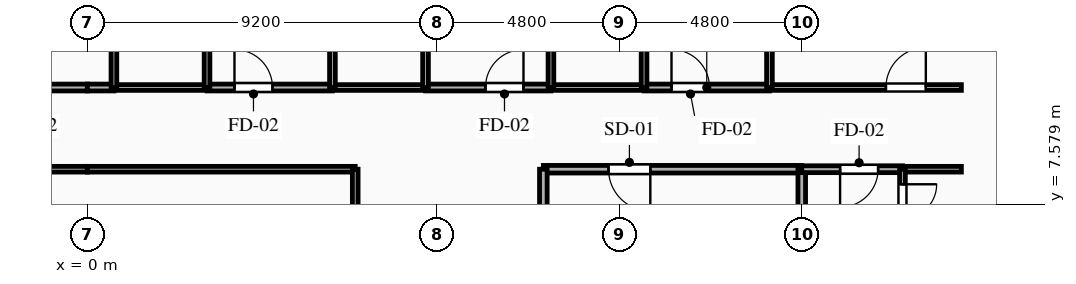
"""IFC4 building model, lengths in metres.
Left out: names, types, materials, properties, quantities, classifications, styles, units other than length and angle.
Written with IfcOpenShell. Run it as: python <this file> out.ifc"""

import sys

from ifc_helpers import new_model, si_unit, direction, frame, frame_2d, origin, place, context, subcontext, project, spatial, rectangle, extrude, element, fill, save


model = new_model("IFC4")
c1 = context("Model", 3, precision=1e-05, world=origin(), true_north=direction((0.0, 1.0)))
c2 = subcontext(c1, "Body", "Model", "MODEL_VIEW")
j1 = project(units=[si_unit("LENGTHUNIT", "METRE"), si_unit("PLANEANGLEUNIT", "RADIAN")], contexts=[c1])
p1 = place(None, origin())
s1 = spatial("IfcSite", under=j1, at=p1, CompositionType="ELEMENT")
p2 = place(p1, origin())
s2 = spatial("IfcBuilding", under=s1, at=p2, CompositionType="ELEMENT")
p3 = place(p2, frame((0.0, 0.0, 53.8)))
s3 = spatial("IfcBuildingStorey", under=s2, at=p3, CompositionType="ELEMENT", Elevation=53.8)
p4 = place(p3, frame((18.8, 8.5, 0.0), z_axis=(0.0, 0.0, 1.0), x_axis=(-1.0, 0.0, 0.0)))
e1 = element("IfcWall", 1, at=p4, inside=s3, PredefinedType="PARTITIONING", context=c2, shape_type="SweptSolid", body=[
    extrude(rectangle(XDim=6.8, YDim=0.2, at=frame_2d((3.4, 0.0))), origin(), (0.0, 0.0, 1.0), 3.035),
])
p5 = place(p4, frame((3.985, 0.0, 0.0)))
e2 = element("IfcOpeningElement", 2, at=p5, cuts=e1, PredefinedType="OPENING", context=c2, shape_type="SweptSolid", body=[
    extrude(rectangle(XDim=1.1, YDim=2.15, at=frame_2d((0.55, 1.075))), frame((0.0, 0.11, 0.0), z_axis=(0.0, -1.0, 0.0), x_axis=(1.0, 0.0, 0.0)), (0.0, 0.0, 1.0), 0.22),
])
p6 = place(p3, frame((12.0, 8.5, 0.0), z_axis=(0.0, 0.0, 1.0), x_axis=(0.0, -1.0, 0.0)))
e3 = element("IfcWall", 3, at=p6, inside=s3, PredefinedType="PARTITIONING", context=c2, shape_type="SweptSolid", body=[
    extrude(rectangle(XDim=2.9, YDim=0.2, at=frame_2d((1.45, 0.0))), origin(), (0.0, 0.0, 1.0), 3.035),
])
p7 = place(p3, frame((18.8, 5.6, 0.0), z_axis=(0.0, 0.0, 1.0), x_axis=(0.0, 1.0, 0.0)))
e4 = element("IfcWall", 4, at=p7, inside=s3, PredefinedType="PARTITIONING", context=c2, shape_type="SweptSolid", body=[
    extrude(rectangle(XDim=2.9, YDim=0.2, at=frame_2d((1.45, 0.0))), origin(), (0.0, 0.0, 1.0), 2.52),
])
p8 = place(p3, frame((-2.6, 10.65, 0.0), z_axis=(0.0, 0.0, 1.0), x_axis=(1.0, 0.0, 0.0)))
e5 = element("IfcWall", 5, at=p8, inside=s3, PredefinedType="PARTITIONING", context=c2, shape_type="SweptSolid", body=[
    extrude(rectangle(XDim=2.6, YDim=0.18, at=frame_2d((1.3, 0.0))), origin(), (0.0, 0.0, 1.0), 3.035),
])
p9 = place(p8, frame((0.635, 0.0, 0.0)))
e6 = element("IfcOpeningElement", 6, at=p9, cuts=e5, PredefinedType="OPENING", context=c2, shape_type="SweptSolid", body=[
    extrude(rectangle(XDim=1.0, YDim=2.15, at=frame_2d((0.5, 1.075))), frame((0.0, 0.1, 0.0), z_axis=(0.0, -1.0, 0.0), x_axis=(1.0, 0.0, 0.0)), (0.0, 0.0, 1.0), 0.2),
])
p10 = place(p3, frame((0.0, 8.5, 0.0), z_axis=(0.0, 0.0, 1.0), x_axis=(-1.0, 0.0, 0.0)))
e7 = element("IfcWall", 7, at=p10, inside=s3, PredefinedType="PARTITIONING", context=c2, shape_type="SweptSolid", body=[
    extrude(rectangle(XDim=7.05, YDim=0.15, at=frame_2d((3.525, 0.0))), origin(), (0.0, 0.0, 1.0), 3.035),
])
p11 = place(p10, frame((1.185, 0.0, 0.0)))
e8 = element("IfcOpeningElement", 8, at=p11, cuts=e7, PredefinedType="OPENING", context=c2, shape_type="SweptSolid", body=[
    extrude(rectangle(XDim=1.05, YDim=2.15, at=frame_2d((0.525, 1.075))), frame((0.0, 0.085, 0.0), z_axis=(0.0, -1.0, 0.0), x_axis=(1.0, 0.0, 0.0)), (0.0, 0.0, 1.0), 0.17),
])
p12 = place(p3, frame((21.45, 8.5, 0.0), z_axis=(0.0, 0.0, 1.0), x_axis=(-1.0, 0.0, 0.0)))
e9 = element("IfcWall", 9, at=p12, inside=s3, PredefinedType="PARTITIONING", context=c2, shape_type="SweptSolid", body=[
    extrude(rectangle(XDim=2.65, YDim=0.18, at=frame_2d((1.325, 0.0))), origin(), (0.0, 0.0, 1.0), 3.035),
])
p13 = place(p12, frame((0.641, 0.0, 0.0)))
e10 = element("IfcOpeningElement", 10, at=p13, cuts=e9, PredefinedType="OPENING", context=c2, shape_type="SweptSolid", body=[
    extrude(rectangle(XDim=1.0, YDim=2.15, at=frame_2d((0.5, 1.075))), frame((0.0, 0.1, 0.0), z_axis=(0.0, -1.0, 0.0), x_axis=(1.0, 0.0, 0.0)), (0.0, 0.0, 1.0), 0.2),
])
p14 = place(p3, frame((23.0, 8.5, 0.0), z_axis=(0.0, 0.0, 1.0), x_axis=(-1.0, 0.0, 0.0)))
e11 = element("IfcWall", 11, at=p14, inside=s3, PredefinedType="PARTITIONING", context=c2, shape_type="SweptSolid", body=[
    extrude(rectangle(XDim=1.55, YDim=0.15, at=frame_2d((0.775, 0.0))), origin(), (0.0, 0.0, 1.0), 3.035),
])
p15 = place(p3, frame((0.0, 10.65, 0.0), z_axis=(0.0, 0.0, 1.0), x_axis=(1.0, 0.0, 0.0)))
e12 = element("IfcWall", 12, at=p15, inside=s3, PredefinedType="PARTITIONING", context=c2, shape_type="SweptSolid", body=[
    extrude(rectangle(XDim=0.7, YDim=0.18, at=frame_2d((0.35, 0.0))), origin(), (0.0, 0.0, 1.0), 3.035),
])
p16 = place(p3, frame((3.15, 10.65, 0.0), z_axis=(0.0, 0.0, 1.0), x_axis=(1.0, 0.0, 0.0)))
e13 = element("IfcWall", 13, at=p16, inside=s3, PredefinedType="PARTITIONING", context=c2, shape_type="SweptSolid", body=[
    extrude(rectangle(XDim=3.3, YDim=0.18, at=frame_2d((1.65, 0.0))), origin(), (0.0, 0.0, 1.0), 3.035),
])
p17 = place(p16, frame((0.722, 0.0, 0.0)))
e14 = element("IfcOpeningElement", 14, at=p17, cuts=e13, PredefinedType="OPENING", context=c2, shape_type="SweptSolid", body=[
    extrude(rectangle(XDim=1.0, YDim=2.15, at=frame_2d((0.5, 1.075))), frame((0.0, 0.1, 0.0), z_axis=(0.0, -1.0, 0.0), x_axis=(1.0, 0.0, 0.0)), (0.0, 0.0, 1.0), 0.2),
])
p18 = place(p3, frame((0.7, 10.65, 0.0), z_axis=(0.0, 0.0, 1.0), x_axis=(1.0, 0.0, 0.0)))
e15 = element("IfcWall", 15, at=p18, inside=s3, PredefinedType="PLUMBINGWALL", context=c2, shape_type="SweptSolid", body=[
    extrude(rectangle(XDim=2.45, YDim=0.15, at=frame_2d((1.225, 0.0))), origin(), (0.0, 0.0, 1.0), 3.035),
])
p19 = place(p3, frame((8.9, 10.65, 0.0), z_axis=(0.0, 0.0, 1.0), x_axis=(1.0, 0.0, 0.0)))
e16 = element("IfcWall", 16, at=p19, inside=s3, PredefinedType="PARTITIONING", context=c2, shape_type="SweptSolid", body=[
    extrude(rectangle(XDim=3.3, YDim=0.18, at=frame_2d((1.65, 0.0))), origin(), (0.0, 0.0, 1.0), 3.035),
])
p20 = place(p19, frame((1.577, 0.0, 0.0)))
e17 = element("IfcOpeningElement", 17, at=p20, cuts=e16, PredefinedType="OPENING", context=c2, shape_type="SweptSolid", body=[
    extrude(rectangle(XDim=1.0, YDim=2.15, at=frame_2d((0.5, 1.075))), frame((0.0, 0.1, 0.0), z_axis=(0.0, -1.0, 0.0), x_axis=(1.0, 0.0, 0.0)), (0.0, 0.0, 1.0), 0.2),
])
p21 = place(p3, frame((6.45, 10.65, 0.0), z_axis=(0.0, 0.0, 1.0), x_axis=(1.0, 0.0, 0.0)))
e18 = element("IfcWall", 18, at=p21, inside=s3, PredefinedType="PLUMBINGWALL", context=c2, shape_type="SweptSolid", body=[
    extrude(rectangle(XDim=2.45, YDim=0.15, at=frame_2d((1.225, 0.0))), origin(), (0.0, 0.0, 1.0), 3.035),
])
p22 = place(p3, frame((14.65, 10.65, 0.0), z_axis=(0.0, 0.0, 1.0), x_axis=(1.0, 0.0, 0.0)))
e19 = element("IfcWall", 19, at=p22, inside=s3, PredefinedType="PARTITIONING", context=c2, shape_type="SweptSolid", body=[
    extrude(rectangle(XDim=3.3, YDim=0.18, at=frame_2d((1.65, 0.0))), origin(), (0.0, 0.0, 1.0), 3.035),
])
p23 = place(p22, frame((0.722, 0.0, 0.0)))
e20 = element("IfcOpeningElement", 20, at=p23, cuts=e19, PredefinedType="OPENING", context=c2, shape_type="SweptSolid", body=[
    extrude(rectangle(XDim=1.0, YDim=2.15, at=frame_2d((0.5, 1.075))), frame((0.0, 0.1, 0.0), z_axis=(0.0, -1.0, 0.0), x_axis=(1.0, 0.0, 0.0)), (0.0, 0.0, 1.0), 0.2),
])
p24 = place(p3, frame((12.2, 10.65, 0.0), z_axis=(0.0, 0.0, 1.0), x_axis=(1.0, 0.0, 0.0)))
e21 = element("IfcWall", 21, at=p24, inside=s3, PredefinedType="PLUMBINGWALL", context=c2, shape_type="SweptSolid", body=[
    extrude(rectangle(XDim=2.45, YDim=0.15, at=frame_2d((1.225, 0.0))), origin(), (0.0, 0.0, 1.0), 3.035),
])
p25 = place(p3, frame((17.95, 10.65, 0.0), z_axis=(0.0, 0.0, 1.0), x_axis=(1.0, 0.0, 0.0)))
e22 = element("IfcWall", 22, at=p25, inside=s3, PredefinedType="PARTITIONING", context=c2, shape_type="SweptSolid", body=[
    extrude(rectangle(XDim=5.05, YDim=0.15, at=frame_2d((2.525, 0.0))), origin(), (0.0, 0.0, 1.0), 3.035),
])
p26 = place(p25, frame((3.065, 0.0, 0.0)))
e23 = element("IfcOpeningElement", 23, at=p26, cuts=e22, PredefinedType="OPENING", context=c2, shape_type="SweptSolid", body=[
    extrude(rectangle(XDim=1.05, YDim=2.15, at=frame_2d((0.525, 1.075))), frame((0.0, 0.085, 0.0), z_axis=(0.0, -1.0, 0.0), x_axis=(1.0, 0.0, 0.0)), (0.0, 0.0, 1.0), 0.17),
])
for number, where, z_axis, x_axis in (
    (24, (7.05, 8.5, 0.0), (0.0, 0.0, 1.0), (-1.0, 0.0, 0.0)),
    (25, (7.05, 1.45, 0.0), (0.0, 0.0, 1.0), (0.0, 1.0, 0.0)),
):
    element("IfcWall", number, at=place(p3, frame(where, z_axis=z_axis, x_axis=x_axis)), inside=s3, PredefinedType="PARTITIONING", context=c2, shape_type="SweptSolid", body=[
        extrude(rectangle(XDim=7.05, YDim=0.15, at=frame_2d((3.525, 0.0))), origin(), (0.0, 0.0, 1.0), 3.035),
    ])
p27 = place(p3, frame((21.45, 8.5, 0.0), z_axis=(0.0, 0.0, 1.0), x_axis=(0.0, -1.0, 0.0)))
e26 = element("IfcWall", 26, at=p27, inside=s3, PredefinedType="PARTITIONING", context=c2, shape_type="SweptSolid", body=[
    extrude(rectangle(XDim=1.692, YDim=0.15, at=frame_2d((0.846, 0.0))), origin(), (0.0, 0.0, 1.0), 3.035),
])
p28 = place(p27, frame((0.396, 0.0, 0.0)))
e27 = element("IfcOpeningElement", 27, at=p28, cuts=e26, PredefinedType="OPENING", context=c2, shape_type="SweptSolid", body=[
    extrude(rectangle(XDim=0.9, YDim=2.1, at=frame_2d((0.45, 1.05))), frame((0.0, 0.085, 0.0), z_axis=(0.0, -1.0, 0.0), x_axis=(1.0, 0.0, 0.0)), (0.0, 0.0, 1.0), 0.17),
])
for number, where, z_axis, x_axis in (
    (28, (0.7, 12.8, 0.0), (0.0, 0.0, 1.0), (0.0, -1.0, 0.0)),
    (29, (3.15, 10.65, 0.0), (0.0, 0.0, 1.0), (0.0, 1.0, 0.0)),
    (30, (6.45, 12.8, 0.0), (0.0, 0.0, 1.0), (0.0, -1.0, 0.0)),
    (31, (8.9, 10.65, 0.0), (0.0, 0.0, 1.0), (0.0, 1.0, 0.0)),
    (32, (12.2, 12.8, 0.0), (0.0, 0.0, 1.0), (0.0, -1.0, 0.0)),
    (33, (14.65, 10.65, 0.0), (0.0, 0.0, 1.0), (0.0, 1.0, 0.0)),
):
    element("IfcWall", number, at=place(p3, frame(where, z_axis=z_axis, x_axis=x_axis)), inside=s3, PredefinedType="PLUMBINGWALL", context=c2, shape_type="SweptSolid", body=[
        extrude(rectangle(XDim=2.15, YDim=0.15, at=frame_2d((1.075, 0.0))), origin(), (0.0, 0.0, 1.0), 3.035),
    ])
p29 = place(p3, frame((17.95, 19.4, 0.0), z_axis=(0.0, 0.0, 1.0), x_axis=(0.0, -1.0, 0.0)))
e34 = element("IfcWall", 34, at=p29, inside=s3, PredefinedType="PARTITIONING", context=c2, shape_type="SweptSolid", body=[
    extrude(rectangle(XDim=8.75, YDim=0.15, at=frame_2d((4.375, 0.0))), origin(), (0.0, 0.0, 1.0), 3.035),
])
p30 = place(p5, origin())
e35 = element("IfcDoor", 35, at=p30, inside=s3, OperationType="SINGLE_SWING_LEFT", PredefinedType="DOOR", context=c2, shape_type="SweptSolid", body=[
    extrude(rectangle(XDim=1.1, YDim=2.15, at=frame_2d((0.55, 1.075))), frame((0.0, 0.025, 0.0), z_axis=(0.0, -1.0, 0.0), x_axis=(1.0, 0.0, 0.0)), (0.0, 0.0, 1.0), 0.05),
])
fill(e2, e35)
p31 = place(p13, origin())
e36 = element("IfcDoor", 36, at=p31, inside=s3, OperationType="SINGLE_SWING_RIGHT", PredefinedType="DOOR", context=c2, shape_type="SweptSolid", body=[
    extrude(rectangle(XDim=1.0, YDim=2.15, at=frame_2d((0.5, 1.075))), frame((0.0, 0.025, 0.0), z_axis=(0.0, -1.0, 0.0), x_axis=(1.0, 0.0, 0.0)), (0.0, 0.0, 1.0), 0.05),
])
fill(e10, e36)
p32 = place(p17, origin())
e37 = element("IfcDoor", 37, at=p32, inside=s3, OperationType="SINGLE_SWING_LEFT", PredefinedType="DOOR", context=c2, shape_type="SweptSolid", body=[
    extrude(rectangle(XDim=1.0, YDim=2.15, at=frame_2d((0.5, 1.075))), frame((0.0, 0.025, 0.0), z_axis=(0.0, -1.0, 0.0), x_axis=(1.0, 0.0, 0.0)), (0.0, 0.0, 1.0), 0.05),
])
fill(e14, e37)
p33 = place(p20, origin())
e38 = element("IfcDoor", 38, at=p33, inside=s3, OperationType="SINGLE_SWING_RIGHT", PredefinedType="DOOR", context=c2, shape_type="SweptSolid", body=[
    extrude(rectangle(XDim=1.0, YDim=2.15, at=frame_2d((0.5, 1.075))), frame((0.0, 0.025, 0.0), z_axis=(0.0, -1.0, 0.0), x_axis=(1.0, 0.0, 0.0)), (0.0, 0.0, 1.0), 0.05),
])
fill(e17, e38)
p34 = place(p23, origin())
e39 = element("IfcDoor", 39, at=p34, inside=s3, OperationType="SINGLE_SWING_LEFT", PredefinedType="DOOR", context=c2, shape_type="SweptSolid", body=[
    extrude(rectangle(XDim=1.0, YDim=2.15, at=frame_2d((0.5, 1.075))), frame((0.0, 0.025, 0.0), z_axis=(0.0, -1.0, 0.0), x_axis=(1.0, 0.0, 0.0)), (0.0, 0.0, 1.0), 0.05),
])
fill(e20, e39)
p35 = place(p26, origin())
e40 = element("IfcDoor", 40, at=p35, inside=s3, OperationType="SINGLE_SWING_RIGHT", PredefinedType="DOOR", context=c2, shape_type="SweptSolid", body=[
    extrude(rectangle(XDim=1.05, YDim=2.15, at=frame_2d((0.525, 1.075))), frame((0.0, 0.025, 0.0), z_axis=(0.0, -1.0, 0.0), x_axis=(1.0, 0.0, 0.0)), (0.0, 0.0, 1.0), 0.05),
])
fill(e23, e40)
p36 = place(p28, origin())
e41 = element("IfcDoor", 41, at=p36, inside=s3, OperationType="SINGLE_SWING_LEFT", PredefinedType="DOOR", context=c2, shape_type="SweptSolid", body=[
    extrude(rectangle(XDim=0.9, YDim=2.1, at=frame_2d((0.45, 1.05))), frame((0.0, 0.025, 0.0), z_axis=(0.0, -1.0, 0.0), x_axis=(1.0, 0.0, 0.0)), (0.0, 0.0, 1.0), 0.05),
])
fill(e27, e41)
save(model, sys.argv[1])
